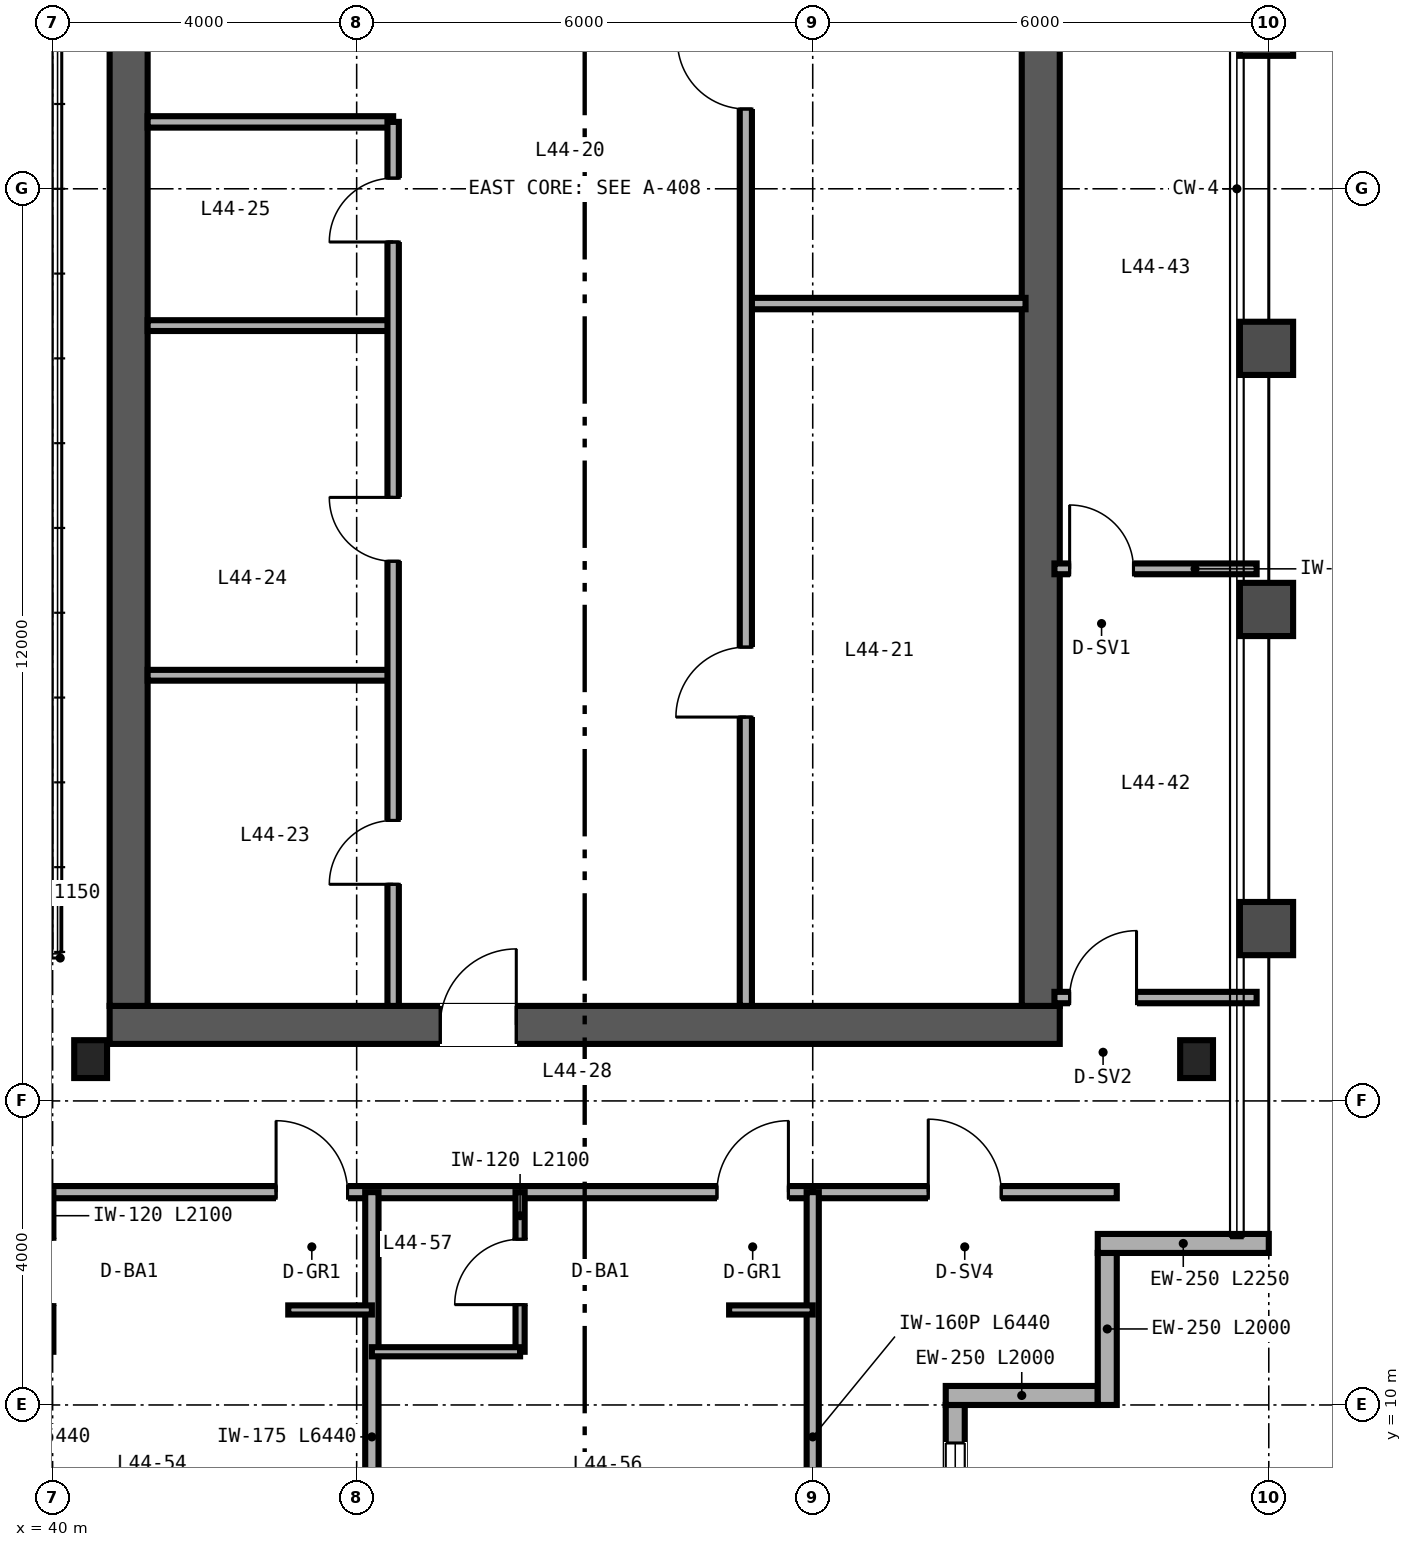
"""IFC4 building model, lengths in metres.
Left out: names, types, materials, properties, quantities, classifications, styles, units other than length and angle.
Written with IfcOpenShell. Run it as: python <this file> out.ifc"""

import sys

from ifc_helpers import new_model, si_unit, direction, frame, frame_2d, origin, origin_2d, place, context, subcontext, project, spatial, rectangle, i_section, extrude, source, transform, mapped, element, fill, save


model = new_model("IFC4")
c1 = context("Model", 3, precision=1e-05, world=origin(), true_north=direction((0.0, 1.0)))
c2 = subcontext(c1, "Body", "Model", "MODEL_VIEW")
j1 = project(units=[si_unit("LENGTHUNIT", "METRE"), si_unit("PLANEANGLEUNIT", "RADIAN")], contexts=[c1])
p1 = place(None, origin())
s1 = spatial("IfcSite", under=j1, at=p1, CompositionType="ELEMENT")
p2 = place(p1, origin())
s2 = spatial("IfcBuilding", under=s1, at=p2, CompositionType="ELEMENT")
p3 = place(p2, frame((0.0, 0.0, 177.6)))
s3 = spatial("IfcBuildingStorey", under=s2, at=p3, CompositionType="ELEMENT", Elevation=177.6)
p4 = place(p3, frame((40.75, 15.0, 0.0), z_axis=(0.0, 0.0, 1.0), x_axis=(1.0, 0.0, 0.0)))
e1 = element("IfcWall", 1, at=p4, inside=s3, PredefinedType="SHEAR", context=c2, shape_type="SweptSolid", body=[
    extrude(rectangle(XDim=12.5, YDim=0.5, at=frame_2d((6.25, 0.0))), origin(), (0.0, 0.0, 1.0), 3.37),
])
p5 = place(p4, frame((4.35, 0.0, 0.0)))
e2 = element("IfcOpeningElement", 2, at=p5, cuts=e1, PredefinedType="OPENING", context=c2, shape_type="SweptSolid", body=[
    extrude(rectangle(XDim=1.0, YDim=2.15, at=frame_2d((0.5, 1.075))), frame((0.0, 0.26, 0.0), z_axis=(0.0, -1.0, 0.0), x_axis=(1.0, 0.0, 0.0)), (0.0, 0.0, 1.0), 0.52),
])
for number, where, z_axis, x_axis in (
    (3, (41.0, 15.25, 0.0), (0.0, 0.0, 1.0), (0.0, 1.0, 0.0)),
    (4, (53.0, 15.25, 0.0), (0.0, 0.0, 1.0), (0.0, 1.0, 0.0)),
):
    element("IfcWall", number, at=place(p3, frame(where, z_axis=z_axis, x_axis=x_axis)), inside=s3, PredefinedType="SHEAR", context=c2, shape_type="SweptSolid", body=[
        extrude(rectangle(XDim=21.5, YDim=0.5, at=frame_2d((10.75, 0.0))), origin(), (0.0, 0.0, 1.0), 3.37),
    ])
m1 = source(origin(), c2, "Body", "SweptSolid", [
    extrude(i_section(OverallWidth=0.432, OverallDepth=0.498, WebThickness=0.056, FlangeThickness=0.089, FilletRadius=0.025, at=origin_2d()), origin(), (0.0, 0.0, 1.0), 3.37),
])
for number, where, z_axis, x_axis in (
    (5, (40.5, 14.55, 0.0), (0.0, 0.0, 1.0), (1.0, 0.0, 0.0)),
    (6, (55.05, 14.55, 0.0), (0.0, 0.0, 1.0), (1.0, 0.0, 0.0)),
):
    element("IfcColumn", number, at=place(p3, frame(where, z_axis=z_axis, x_axis=x_axis)), inside=s3, PredefinedType="COLUMN", context=c2, shape_type="MappedRepresentation", body=[
        mapped(m1, transform((0.0, 0.0, 0.0), scale=1.0)),
    ])
p6 = place(p3, frame((51.875, 8.0, 0.0), z_axis=(0.0, 0.0, 1.0), x_axis=(0.0, 1.0, 0.0)))
e7 = element("IfcWall", 7, at=p6, inside=s3, PredefinedType="SOLIDWALL", context=c2, shape_type="SweptSolid", body=[
    extrude(rectangle(XDim=2.0, YDim=0.25, at=frame_2d((1.0, 0.0))), origin(), (0.0, 0.0, 1.0), 3.37),
])
p7 = place(p6, frame((0.5, 0.0, 0.85)))
e8 = element("IfcOpeningElement", 8, at=p7, cuts=e7, PredefinedType="OPENING", context=c2, shape_type="SweptSolid", body=[
    extrude(rectangle(XDim=1.0, YDim=1.9, at=frame_2d((0.5, 0.95))), frame((0.0, 0.135, 0.0), z_axis=(0.0, -1.0, 0.0), x_axis=(1.0, 0.0, 0.0)), (0.0, 0.0, 1.0), 0.27),
])
for number, where, z_axis, x_axis in (
    (9, (51.75, 10.125, 0.0), (0.0, 0.0, 1.0), (1.0, 0.0, 0.0)),
    (10, (53.875, 10.0, 0.0), (0.0, 0.0, 1.0), (0.0, 1.0, 0.0)),
):
    element("IfcWall", number, at=place(p3, frame(where, z_axis=z_axis, x_axis=x_axis)), inside=s3, PredefinedType="SOLIDWALL", context=c2, shape_type="SweptSolid", body=[
        extrude(rectangle(XDim=2.0, YDim=0.25, at=frame_2d((1.0, 0.0))), origin(), (0.0, 0.0, 1.0), 3.37),
    ])
p8 = place(p3, frame((53.75, 12.125, 0.0), z_axis=(0.0, 0.0, 1.0), x_axis=(1.0, 0.0, 0.0)))
e11 = element("IfcWall", 11, at=p8, inside=s3, PredefinedType="SOLIDWALL", context=c2, shape_type="SweptSolid", body=[
    extrude(rectangle(XDim=2.25, YDim=0.25, at=frame_2d((1.125, 0.0))), origin(), (0.0, 0.0, 1.0), 3.37),
])
p9 = place(p3, frame((49.12, 24.49, 0.0), z_axis=(0.0, 0.0, 1.0), x_axis=(1.0, 0.0, 0.0)))
e12 = element("IfcWall", 12, at=p9, inside=s3, PredefinedType="PARTITIONING", context=c2, shape_type="SweptSolid", body=[
    extrude(rectangle(XDim=3.68, YDim=0.15, at=frame_2d((1.84, 0.0))), origin(), (0.0, 0.0, 1.0), 3.37),
])
p10 = place(p3, frame((49.12, 15.25, 0.0), z_axis=(0.0, 0.0, 1.0), x_axis=(0.0, 1.0, 0.0)))
e13 = element("IfcWall", 13, at=p10, inside=s3, PredefinedType="PARTITIONING", context=c2, shape_type="SweptSolid", body=[
    extrude(rectangle(XDim=16.13, YDim=0.16, at=frame_2d((8.065, 0.0))), origin(), (0.0, 0.0, 1.0), 2.443),
])
p11 = place(p10, frame((3.8, 0.0, 0.0)))
e14 = element("IfcOpeningElement", 14, at=p11, cuts=e13, PredefinedType="OPENING", context=c2, shape_type="SweptSolid", body=[
    extrude(rectangle(XDim=0.92, YDim=2.15, at=frame_2d((0.46, 1.075))), frame((0.0, 0.09, 0.0), z_axis=(0.0, -1.0, 0.0), x_axis=(1.0, 0.0, 0.0)), (0.0, 0.0, 1.0), 0.18),
])
p12 = place(p10, frame((11.8, 0.0, 0.0)))
e15 = element("IfcOpeningElement", 15, at=p12, cuts=e13, PredefinedType="OPENING", context=c2, shape_type="SweptSolid", body=[
    extrude(rectangle(XDim=0.9, YDim=2.15, at=frame_2d((0.45, 1.075))), frame((0.0, 0.09, 0.0), z_axis=(0.0, -1.0, 0.0), x_axis=(1.0, 0.0, 0.0)), (0.0, 0.0, 1.0), 0.18),
])
p13 = place(p3, frame((41.25, 26.88, 0.0), z_axis=(0.0, 0.0, 1.0), x_axis=(1.0, 0.0, 0.0)))
e16 = element("IfcWall", 16, at=p13, inside=s3, PredefinedType="PARTITIONING", context=c2, shape_type="SweptSolid", body=[
    extrude(rectangle(XDim=3.23, YDim=0.15, at=frame_2d((1.615, 0.0))), origin(), (0.0, 0.0, 1.0), 3.37),
])
for number, where, z_axis, x_axis in (
    (17, (41.25, 19.6, 0.0), (0.0, 0.0, 1.0), (1.0, 0.0, 0.0)),
    (18, (41.25, 24.2, 0.0), (0.0, 0.0, 1.0), (1.0, 0.0, 0.0)),
):
    element("IfcWall", number, at=place(p3, frame(where, z_axis=z_axis, x_axis=x_axis)), inside=s3, PredefinedType="PARTITIONING", context=c2, shape_type="SweptSolid", body=[
        extrude(rectangle(XDim=3.23, YDim=0.142, at=frame_2d((1.615, 0.0))), origin(), (0.0, 0.0, 1.0), 3.37),
    ])
p14 = place(p3, frame((44.48, 15.25, 0.0), z_axis=(0.0, 0.0, 1.0), x_axis=(0.0, 1.0, 0.0)))
e19 = element("IfcWall", 19, at=p14, inside=s3, PredefinedType="PARTITIONING", context=c2, shape_type="SweptSolid", body=[
    extrude(rectangle(XDim=11.63, YDim=0.15, at=frame_2d((5.815, 0.0))), origin(), (0.0, 0.0, 1.0), 3.37),
])
p15 = place(p14, frame((1.6, 0.0, 0.0)))
e20 = element("IfcOpeningElement", 20, at=p15, cuts=e19, PredefinedType="OPENING", context=c2, shape_type="SweptSolid", body=[
    extrude(rectangle(XDim=0.84, YDim=2.1, at=frame_2d((0.42, 1.05))), frame((0.0, 0.085, 0.0), z_axis=(0.0, -1.0, 0.0), x_axis=(1.0, 0.0, 0.0)), (0.0, 0.0, 1.0), 0.17),
])
p16 = place(p14, frame((5.85, 0.0, 0.0)))
e21 = element("IfcOpeningElement", 21, at=p16, cuts=e19, PredefinedType="OPENING", context=c2, shape_type="SweptSolid", body=[
    extrude(rectangle(XDim=0.84, YDim=2.1, at=frame_2d((0.42, 1.05))), frame((0.0, 0.085, 0.0), z_axis=(0.0, -1.0, 0.0), x_axis=(1.0, 0.0, 0.0)), (0.0, 0.0, 1.0), 0.17),
])
p17 = place(p14, frame((10.05, 0.0, 0.0)))
e22 = element("IfcOpeningElement", 22, at=p17, cuts=e19, PredefinedType="OPENING", context=c2, shape_type="SweptSolid", body=[
    extrude(rectangle(XDim=0.84, YDim=2.1, at=frame_2d((0.42, 1.05))), frame((0.0, 0.085, 0.0), z_axis=(0.0, -1.0, 0.0), x_axis=(1.0, 0.0, 0.0)), (0.0, 0.0, 1.0), 0.17),
])
p18 = place(p3, frame((53.18, 15.36, 0.0), z_axis=(0.0, 0.0, 1.0), x_axis=(1.0, 0.0, 0.0)))
e23 = element("IfcWall", 23, at=p18, inside=s3, PredefinedType="PARTITIONING", context=c2, shape_type="SweptSolid", body=[
    extrude(rectangle(XDim=2.66, YDim=0.15, at=frame_2d((1.33, 0.0))), origin(), (0.0, 0.0, 1.0), 2.591),
])
p19 = place(p18, frame((0.2, 0.0, 0.0)))
e24 = element("IfcOpeningElement", 24, at=p19, cuts=e23, PredefinedType="OPENING", context=c2, shape_type="SweptSolid", body=[
    extrude(rectangle(XDim=0.88, YDim=2.15, at=frame_2d((0.44, 1.075))), frame((0.0, 0.085, 0.0), z_axis=(0.0, -1.0, 0.0), x_axis=(1.0, 0.0, 0.0)), (0.0, 0.0, 1.0), 0.17),
])
p20 = place(p3, frame((53.18, 21.0, 0.0), z_axis=(0.0, 0.0, 1.0), x_axis=(1.0, 0.0, 0.0)))
e25 = element("IfcWall", 25, at=p20, inside=s3, PredefinedType="PARTITIONING", context=c2, shape_type="SweptSolid", body=[
    extrude(rectangle(XDim=2.66, YDim=0.142, at=frame_2d((1.33, 0.0))), origin(), (0.0, 0.0, 1.0), 2.591),
])
p21 = place(p20, frame((0.2, 0.0, 0.0)))
e26 = element("IfcOpeningElement", 26, at=p21, cuts=e25, PredefinedType="OPENING", context=c2, shape_type="SweptSolid", body=[
    extrude(rectangle(XDim=0.84, YDim=2.1, at=frame_2d((0.42, 1.05))), frame((0.0, 0.081, 0.0), z_axis=(0.0, -1.0, 0.0), x_axis=(1.0, 0.0, 0.0)), (0.0, 0.0, 1.0), 0.162),
])
p22 = place(p3, frame((50.0, 12.8, 0.0), z_axis=(0.0, 0.0, 1.0), x_axis=(1.0, 0.0, 0.0)))
e27 = element("IfcWall", 27, at=p22, inside=s3, PredefinedType="PARTITIONING", context=c2, shape_type="SweptSolid", body=[
    extrude(rectangle(XDim=4.0, YDim=0.16, at=frame_2d((2.0, 0.0))), origin(), (0.0, 0.0, 1.0), 3.37),
])
p23 = place(p22, frame((1.52, 0.0, 0.0)))
e28 = element("IfcOpeningElement", 28, at=p23, cuts=e27, PredefinedType="OPENING", context=c2, shape_type="SweptSolid", body=[
    extrude(rectangle(XDim=0.96, YDim=2.15, at=frame_2d((0.48, 1.075))), frame((0.0, 0.09, 0.0), z_axis=(0.0, -1.0, 0.0), x_axis=(1.0, 0.0, 0.0)), (0.0, 0.0, 1.0), 0.18),
])
p24 = place(p3, frame((38.0, 12.8, 0.0), z_axis=(0.0, 0.0, 1.0), x_axis=(1.0, 0.0, 0.0)))
e29 = element("IfcWall", 29, at=p24, inside=s3, PredefinedType="PARTITIONING", context=c2, shape_type="SweptSolid", body=[
    extrude(rectangle(XDim=12.0, YDim=0.16, at=frame_2d((6.0, 0.0))), origin(), (0.0, 0.0, 1.0), 2.913),
])
p25 = place(p24, frame((4.94, 0.0, 0.0)))
e30 = element("IfcOpeningElement", 30, at=p25, cuts=e29, PredefinedType="OPENING", context=c2, shape_type="SweptSolid", body=[
    extrude(rectangle(XDim=0.94, YDim=2.15, at=frame_2d((0.47, 1.075))), frame((0.0, 0.09, 0.0), z_axis=(0.0, -1.0, 0.0), x_axis=(1.0, 0.0, 0.0)), (0.0, 0.0, 1.0), 0.18),
])
p26 = place(p24, frame((10.74, 0.0, 0.0)))
e31 = element("IfcOpeningElement", 31, at=p26, cuts=e29, PredefinedType="OPENING", context=c2, shape_type="SweptSolid", body=[
    extrude(rectangle(XDim=0.94, YDim=2.15, at=frame_2d((0.47, 1.075))), frame((0.0, 0.09, 0.0), z_axis=(0.0, -1.0, 0.0), x_axis=(1.0, 0.0, 0.0)), (0.0, 0.0, 1.0), 0.18),
])
p27 = place(p3, frame((50.0, 6.36, 0.0), z_axis=(0.0, 0.0, 1.0), x_axis=(0.0, 1.0, 0.0)))
e32 = element("IfcWall", 32, at=p27, inside=s3, PredefinedType="PARTITIONING", context=c2, shape_type="SweptSolid", body=[
    extrude(rectangle(XDim=6.44, YDim=0.16, at=frame_2d((3.22, 0.0))), origin(), (0.0, 0.0, 1.0), 2.677),
])
p28 = place(p3, frame((44.2, 6.36, 0.0), z_axis=(0.0, 0.0, 1.0), x_axis=(0.0, 1.0, 0.0)))
e33 = element("IfcWall", 33, at=p28, inside=s3, PredefinedType="PARTITIONING", context=c2, shape_type="SweptSolid", body=[
    extrude(rectangle(XDim=6.44, YDim=0.175, at=frame_2d((3.22, 0.0))), origin(), (0.0, 0.0, 1.0), 2.677),
])
p29 = place(p3, frame((39.95, 10.7, 0.0), z_axis=(0.0, 0.0, 1.0), x_axis=(0.0, 1.0, 0.0)))
e34 = element("IfcWall", 34, at=p29, inside=s3, PredefinedType="PARTITIONING", context=c2, shape_type="SweptSolid", body=[
    extrude(rectangle(XDim=2.1, YDim=0.12, at=frame_2d((1.05, 0.0))), origin(), (0.0, 0.0, 1.0), 3.37),
])
p30 = place(p29, frame((0.62, 0.0, 0.0)))
e35 = element("IfcOpeningElement", 35, at=p30, cuts=e34, PredefinedType="OPENING", context=c2, shape_type="SweptSolid", body=[
    extrude(rectangle(XDim=0.86, YDim=2.1, at=frame_2d((0.43, 1.05))), frame((0.0, 0.07, 0.0), z_axis=(0.0, -1.0, 0.0), x_axis=(1.0, 0.0, 0.0)), (0.0, 0.0, 1.0), 0.14),
])
p31 = place(p3, frame((43.1, 11.25, 0.0), z_axis=(0.0, 0.0, 1.0), x_axis=(1.0, 0.0, 0.0)))
e36 = element("IfcWall", 36, at=p31, inside=s3, PredefinedType="PARTITIONING", context=c2, shape_type="SweptSolid", body=[
    extrude(rectangle(XDim=1.1, YDim=0.12, at=frame_2d((0.55, 0.0))), origin(), (0.0, 0.0, 1.0), 3.37),
])
p32 = place(p3, frame((46.15, 10.7, 0.0), z_axis=(0.0, 0.0, 1.0), x_axis=(0.0, 1.0, 0.0)))
e37 = element("IfcWall", 37, at=p32, inside=s3, PredefinedType="PARTITIONING", context=c2, shape_type="SweptSolid", body=[
    extrude(rectangle(XDim=2.1, YDim=0.12, at=frame_2d((1.05, 0.0))), origin(), (0.0, 0.0, 1.0), 3.37),
])
p33 = place(p32, frame((0.62, 0.0, 0.0)))
e38 = element("IfcOpeningElement", 38, at=p33, cuts=e37, PredefinedType="OPENING", context=c2, shape_type="SweptSolid", body=[
    extrude(rectangle(XDim=0.86, YDim=2.1, at=frame_2d((0.43, 1.05))), frame((0.0, 0.07, 0.0), z_axis=(0.0, -1.0, 0.0), x_axis=(1.0, 0.0, 0.0)), (0.0, 0.0, 1.0), 0.14),
])
p34 = place(p3, frame((44.2, 10.7, 0.0), z_axis=(0.0, 0.0, 1.0), x_axis=(1.0, 0.0, 0.0)))
e39 = element("IfcWall", 39, at=p34, inside=s3, PredefinedType="PARTITIONING", context=c2, shape_type="SweptSolid", body=[
    extrude(rectangle(XDim=1.95, YDim=0.12, at=frame_2d((0.975, 0.0))), origin(), (0.0, 0.0, 1.0), 3.37),
])
p35 = place(p3, frame((48.9, 11.25, 0.0), z_axis=(0.0, 0.0, 1.0), x_axis=(1.0, 0.0, 0.0)))
e40 = element("IfcWall", 40, at=p35, inside=s3, PredefinedType="PARTITIONING", context=c2, shape_type="SweptSolid", body=[
    extrude(rectangle(XDim=1.1, YDim=0.12, at=frame_2d((0.55, 0.0))), origin(), (0.0, 0.0, 1.0), 3.37),
])
m2 = source(origin(), c2, "Body", "SweptSolid", [
    extrude(rectangle(XDim=1.0, YDim=1.9, at=frame_2d((0.5, 0.95))), frame((0.0, 0.03, 0.0), z_axis=(0.0, -1.0, 0.0), x_axis=(1.0, 0.0, 0.0)), (0.0, 0.0, 1.0), 0.06),
])
p36 = place(p7, origin())
e41 = element("IfcWindow", 41, at=p36, inside=s3, PartitioningType="SINGLE_PANEL", PredefinedType="WINDOW", context=c2, shape_type="MappedRepresentation", body=[
    mapped(m2, transform((0.0, 0.0, 0.0), scale=1.0)),
])
fill(e8, e41)
m3 = source(origin(), c2, "Body", "SweptSolid", [
    extrude(rectangle(XDim=1.0, YDim=2.15, at=frame_2d((0.5, 1.075))), frame((0.0, 0.025, 0.0), z_axis=(0.0, -1.0, 0.0), x_axis=(1.0, 0.0, 0.0)), (0.0, 0.0, 1.0), 0.05),
])
p37 = place(p5, origin())
e42 = element("IfcDoor", 42, at=p37, inside=s3, OperationType="SINGLE_SWING_RIGHT", PredefinedType="DOOR", context=c2, shape_type="MappedRepresentation", body=[
    mapped(m3, transform((0.0, 0.0, 0.0), scale=1.0)),
])
fill(e2, e42)
m4 = source(origin(), c2, "Body", "SweptSolid", [
    extrude(rectangle(XDim=0.92, YDim=2.15, at=frame_2d((0.46, 1.075))), frame((0.0, 0.025, 0.0), z_axis=(0.0, -1.0, 0.0), x_axis=(1.0, 0.0, 0.0)), (0.0, 0.0, 1.0), 0.05),
])
p38 = place(p11, origin())
e43 = element("IfcDoor", 43, at=p38, inside=s3, OperationType="SINGLE_SWING_LEFT", PredefinedType="DOOR", context=c2, shape_type="MappedRepresentation", body=[
    mapped(m4, transform((0.0, 0.0, 0.0), scale=1.0)),
])
fill(e14, e43)
m5 = source(origin(), c2, "Body", "SweptSolid", [
    extrude(rectangle(XDim=0.9, YDim=2.15, at=frame_2d((0.45, 1.075))), frame((0.0, 0.025, 0.0), z_axis=(0.0, -1.0, 0.0), x_axis=(1.0, 0.0, 0.0)), (0.0, 0.0, 1.0), 0.05),
])
p39 = place(p12, origin())
e44 = element("IfcDoor", 44, at=p39, inside=s3, OperationType="SINGLE_SWING_RIGHT", PredefinedType="DOOR", context=c2, shape_type="MappedRepresentation", body=[
    mapped(m5, transform((0.0, 0.0, 0.0), scale=1.0)),
])
fill(e15, e44)
m6 = source(origin(), c2, "Body", "SweptSolid", [
    extrude(rectangle(XDim=0.84, YDim=2.1, at=frame_2d((0.42, 1.05))), frame((0.0, 0.025, 0.0), z_axis=(0.0, -1.0, 0.0), x_axis=(1.0, 0.0, 0.0)), (0.0, 0.0, 1.0), 0.05),
])
p40 = place(p15, origin())
e45 = element("IfcDoor", 45, at=p40, inside=s3, OperationType="SINGLE_SWING_LEFT", PredefinedType="DOOR", context=c2, shape_type="MappedRepresentation", body=[
    mapped(m6, transform((0.0, 0.0, 0.0), scale=1.0)),
])
fill(e20, e45)
p41 = place(p16, origin())
e46 = element("IfcDoor", 46, at=p41, inside=s3, OperationType="SINGLE_SWING_RIGHT", PredefinedType="DOOR", context=c2, shape_type="MappedRepresentation", body=[
    mapped(m6, transform((0.0, 0.0, 0.0), scale=1.0)),
])
fill(e21, e46)
p42 = place(p17, origin())
e47 = element("IfcDoor", 47, at=p42, inside=s3, OperationType="SINGLE_SWING_LEFT", PredefinedType="DOOR", context=c2, shape_type="MappedRepresentation", body=[
    mapped(m6, transform((0.0, 0.0, 0.0), scale=1.0)),
])
fill(e22, e47)
m7 = source(origin(), c2, "Body", "SweptSolid", [
    extrude(rectangle(XDim=0.88, YDim=2.15, at=frame_2d((0.44, 1.075))), frame((0.0, 0.025, 0.0), z_axis=(0.0, -1.0, 0.0), x_axis=(1.0, 0.0, 0.0)), (0.0, 0.0, 1.0), 0.05),
])
p43 = place(p19, origin())
e48 = element("IfcDoor", 48, at=p43, inside=s3, OperationType="SINGLE_SWING_RIGHT", PredefinedType="DOOR", context=c2, shape_type="MappedRepresentation", body=[
    mapped(m7, transform((0.0, 0.0, 0.0), scale=1.0)),
])
fill(e24, e48)
p44 = place(p21, origin())
e49 = element("IfcDoor", 49, at=p44, inside=s3, OperationType="SINGLE_SWING_LEFT", PredefinedType="DOOR", context=c2, shape_type="MappedRepresentation", body=[
    mapped(m6, transform((0.0, 0.0, 0.0), scale=1.0)),
])
fill(e26, e49)
m8 = source(origin(), c2, "Body", "SweptSolid", [
    extrude(rectangle(XDim=0.96, YDim=2.15, at=frame_2d((0.48, 1.075))), frame((0.0, 0.025, 0.0), z_axis=(0.0, -1.0, 0.0), x_axis=(1.0, 0.0, 0.0)), (0.0, 0.0, 1.0), 0.05),
])
p45 = place(p23, origin())
e50 = element("IfcDoor", 50, at=p45, inside=s3, OperationType="SINGLE_SWING_LEFT", PredefinedType="DOOR", context=c2, shape_type="MappedRepresentation", body=[
    mapped(m8, transform((0.0, 0.0, 0.0), scale=1.0)),
])
fill(e28, e50)
m9 = source(origin(), c2, "Body", "SweptSolid", [
    extrude(rectangle(XDim=0.86, YDim=2.1, at=frame_2d((0.43, 1.05))), frame((0.0, 0.025, 0.0), z_axis=(0.0, -1.0, 0.0), x_axis=(1.0, 0.0, 0.0)), (0.0, 0.0, 1.0), 0.05),
])
p46 = place(p33, origin())
e51 = element("IfcDoor", 51, at=p46, inside=s3, OperationType="SINGLE_SWING_LEFT", PredefinedType="DOOR", context=c2, shape_type="MappedRepresentation", body=[
    mapped(m9, transform((0.0, 0.0, 0.0), scale=1.0)),
])
fill(e38, e51)
m10 = source(origin(), c2, "Body", "SweptSolid", [
    extrude(rectangle(XDim=0.94, YDim=2.15, at=frame_2d((0.47, 1.075))), frame((0.0, 0.025, 0.0), z_axis=(0.0, -1.0, 0.0), x_axis=(1.0, 0.0, 0.0)), (0.0, 0.0, 1.0), 0.05),
])
p47 = place(p25, origin())
e52 = element("IfcDoor", 52, at=p47, inside=s3, OperationType="SINGLE_SWING_LEFT", PredefinedType="DOOR", context=c2, shape_type="MappedRepresentation", body=[
    mapped(m10, transform((0.0, 0.0, 0.0), scale=1.0)),
])
fill(e30, e52)
p48 = place(p26, origin())
e53 = element("IfcDoor", 53, at=p48, inside=s3, OperationType="SINGLE_SWING_RIGHT", PredefinedType="DOOR", context=c2, shape_type="MappedRepresentation", body=[
    mapped(m10, transform((0.0, 0.0, 0.0), scale=1.0)),
])
fill(e31, e53)
save(model, sys.argv[1])
